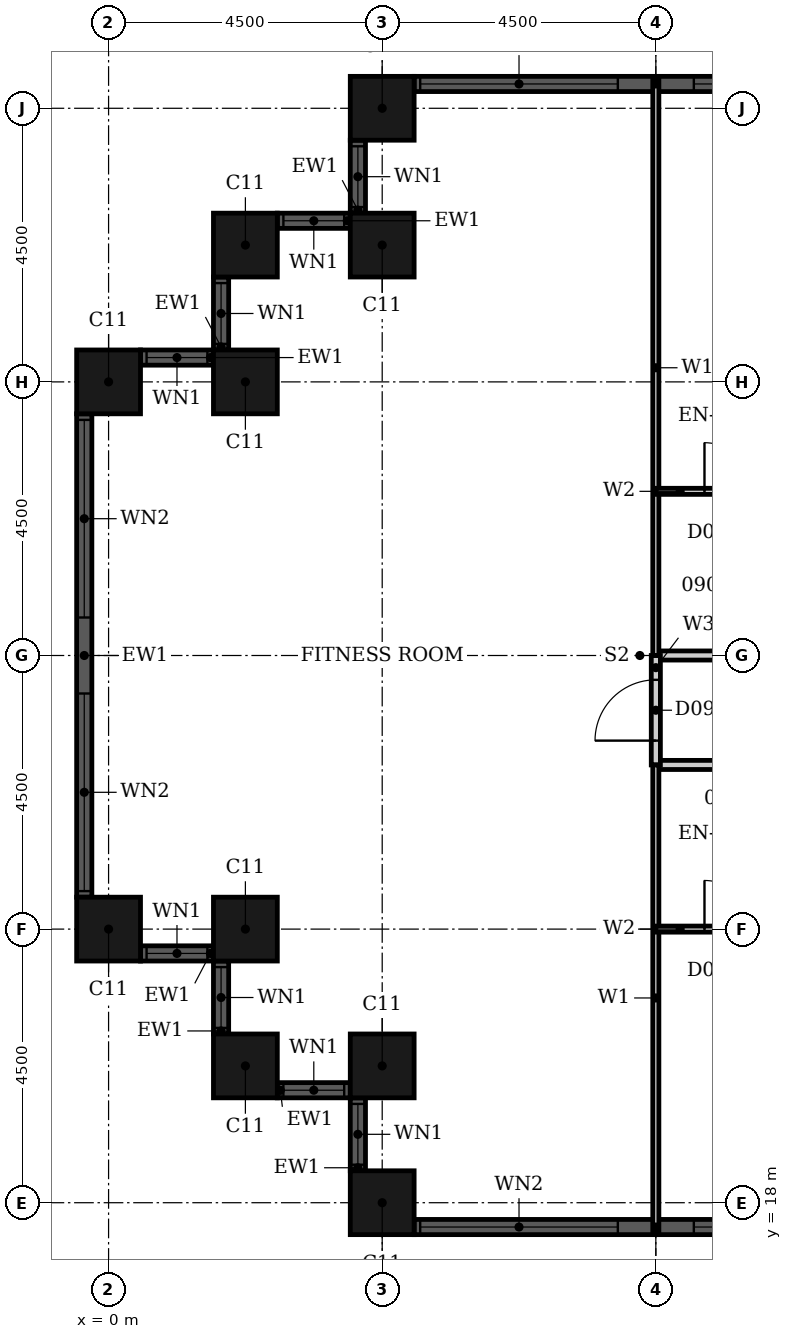
"""IFC4 building model, lengths in metres.
Left out: names, types, materials, properties, quantities, classifications, styles, units other than length and angle.
Written with IfcOpenShell. Run it as: python <this file> out.ifc"""

import sys

from ifc_helpers import new_model, si_unit, direction, frame, frame_2d, origin, origin_2d, place, context, subcontext, project, spatial, rectangle, hollow_rectangle, extrude, element, fill, save


model = new_model("IFC4")
c1 = context("Model", 3, precision=1e-05, world=origin(), true_north=direction((0.0, 1.0)))
c2 = subcontext(c1, "Body", "Model", "MODEL_VIEW")
j1 = project(units=[si_unit("LENGTHUNIT", "METRE"), si_unit("PLANEANGLEUNIT", "RADIAN")], contexts=[c1])
p1 = place(None, origin())
s1 = spatial("IfcSite", under=j1, at=p1, CompositionType="ELEMENT")
p2 = place(p1, origin())
s2 = spatial("IfcBuilding", under=s1, at=p2, CompositionType="ELEMENT")
p3 = place(p2, frame((0.0, 0.0, 44.4)))
s3 = spatial("IfcBuildingStorey", under=s2, at=p3, CompositionType="ELEMENT", Elevation=44.4)
for number, where, z_axis, x_axis in (
    (1, (4.5, 36.0, 0.0), (0.0, 0.0, 1.0), (1.0, 0.0, 0.0)),
    (2, (4.5, 33.75, 0.0), (0.0, 0.0, 1.0), (1.0, 0.0, 0.0)),
    (3, (2.25, 33.75, 0.0), (0.0, 0.0, 1.0), (1.0, 0.0, 0.0)),
    (4, (2.25, 31.5, 0.0), (0.0, 0.0, 1.0), (1.0, 0.0, 0.0)),
    (5, (0.0, 31.5, 0.0), (0.0, 0.0, 1.0), (1.0, 0.0, 0.0)),
    (6, (0.0, 22.5, 0.0), (0.0, 0.0, 1.0), (1.0, 0.0, 0.0)),
    (7, (2.25, 22.5, 0.0), (0.0, 0.0, 1.0), (1.0, 0.0, 0.0)),
    (8, (2.25, 20.25, 0.0), (0.0, 0.0, 1.0), (1.0, 0.0, 0.0)),
    (9, (4.5, 20.25, 0.0), (0.0, 0.0, 1.0), (1.0, 0.0, 0.0)),
    (10, (4.5, 18.0, 0.0), (0.0, 0.0, 1.0), (1.0, 0.0, 0.0)),
):
    element("IfcColumn", number, at=place(p3, frame(where, z_axis=z_axis, x_axis=x_axis)), inside=s3, PredefinedType="COLUMN", context=c2, shape_type="SweptSolid", body=[
        extrude(hollow_rectangle(XDim=1.05, YDim=1.05, WallThickness=0.034, at=origin_2d()), origin(), (0.0, 0.0, 1.0), 3.6),
    ])
p4 = place(p3, frame((12.975, 36.4, 0.0), z_axis=(0.0, 0.0, 1.0), x_axis=(-1.0, 0.0, 0.0)))
e11 = element("IfcWall", 11, at=p4, inside=s3, PredefinedType="SOLIDWALL", context=c2, shape_type="SweptSolid", body=[
    extrude(rectangle(XDim=7.95, YDim=0.25, at=frame_2d((3.975, 0.0))), origin(), (0.0, 0.0, 1.0), 3.6),
])
p5 = place(p4, frame((0.1, 0.0, 0.9)))
e12 = element("IfcOpeningElement", 12, at=p5, cuts=e11, PredefinedType="OPENING", context=c2, shape_type="SweptSolid", body=[
    extrude(rectangle(XDim=3.25, YDim=2.08, at=frame_2d((1.625, 1.04))), frame((0.0, 0.135, 0.0), z_axis=(0.0, -1.0, 0.0), x_axis=(1.0, 0.0, 0.0)), (0.0, 0.0, 1.0), 0.27),
])
p6 = place(p4, frame((4.6, 0.0, 0.9)))
e13 = element("IfcOpeningElement", 13, at=p6, cuts=e11, PredefinedType="OPENING", context=c2, shape_type="SweptSolid", body=[
    extrude(rectangle(XDim=3.25, YDim=2.08, at=frame_2d((1.625, 1.04))), frame((0.0, 0.135, 0.0), z_axis=(0.0, -1.0, 0.0), x_axis=(1.0, 0.0, 0.0)), (0.0, 0.0, 1.0), 0.27),
])
p7 = place(p3, frame((4.1, 35.475, 0.0), z_axis=(0.0, 0.0, 1.0), x_axis=(0.0, -1.0, 0.0)))
e14 = element("IfcWall", 14, at=p7, inside=s3, PredefinedType="SOLIDWALL", context=c2, shape_type="SweptSolid", body=[
    extrude(rectangle(XDim=1.2, YDim=0.25, at=frame_2d((0.6, 0.0))), origin(), (0.0, 0.0, 1.0), 3.6),
])
p8 = place(p7, frame((0.1, 0.0, 0.9)))
e15 = element("IfcOpeningElement", 15, at=p8, cuts=e14, PredefinedType="OPENING", context=c2, shape_type="SweptSolid", body=[
    extrude(rectangle(XDim=1.0, YDim=2.08, at=frame_2d((0.5, 1.04))), frame((0.0, 0.135, 0.0), z_axis=(0.0, -1.0, 0.0), x_axis=(1.0, 0.0, 0.0)), (0.0, 0.0, 1.0), 0.27),
])
p9 = place(p3, frame((3.975, 34.15, 0.0), z_axis=(0.0, 0.0, 1.0), x_axis=(-1.0, 0.0, 0.0)))
e16 = element("IfcWall", 16, at=p9, inside=s3, PredefinedType="SOLIDWALL", context=c2, shape_type="SweptSolid", body=[
    extrude(rectangle(XDim=1.2, YDim=0.25, at=frame_2d((0.6, 0.0))), origin(), (0.0, 0.0, 1.0), 3.6),
])
p10 = place(p9, frame((0.1, 0.0, 0.9)))
e17 = element("IfcOpeningElement", 17, at=p10, cuts=e16, PredefinedType="OPENING", context=c2, shape_type="SweptSolid", body=[
    extrude(rectangle(XDim=1.0, YDim=2.08, at=frame_2d((0.5, 1.04))), frame((0.0, 0.135, 0.0), z_axis=(0.0, -1.0, 0.0), x_axis=(1.0, 0.0, 0.0)), (0.0, 0.0, 1.0), 0.27),
])
p11 = place(p3, frame((1.85, 33.225, 0.0), z_axis=(0.0, 0.0, 1.0), x_axis=(0.0, -1.0, 0.0)))
e18 = element("IfcWall", 18, at=p11, inside=s3, PredefinedType="SOLIDWALL", context=c2, shape_type="SweptSolid", body=[
    extrude(rectangle(XDim=1.2, YDim=0.25, at=frame_2d((0.6, 0.0))), origin(), (0.0, 0.0, 1.0), 3.6),
])
p12 = place(p11, frame((0.1, 0.0, 0.9)))
e19 = element("IfcOpeningElement", 19, at=p12, cuts=e18, PredefinedType="OPENING", context=c2, shape_type="SweptSolid", body=[
    extrude(rectangle(XDim=1.0, YDim=2.08, at=frame_2d((0.5, 1.04))), frame((0.0, 0.135, 0.0), z_axis=(0.0, -1.0, 0.0), x_axis=(1.0, 0.0, 0.0)), (0.0, 0.0, 1.0), 0.27),
])
p13 = place(p3, frame((1.725, 31.9, 0.0), z_axis=(0.0, 0.0, 1.0), x_axis=(-1.0, 0.0, 0.0)))
e20 = element("IfcWall", 20, at=p13, inside=s3, PredefinedType="SOLIDWALL", context=c2, shape_type="SweptSolid", body=[
    extrude(rectangle(XDim=1.2, YDim=0.25, at=frame_2d((0.6, 0.0))), origin(), (0.0, 0.0, 1.0), 3.6),
])
p14 = place(p13, frame((0.1, 0.0, 0.9)))
e21 = element("IfcOpeningElement", 21, at=p14, cuts=e20, PredefinedType="OPENING", context=c2, shape_type="SweptSolid", body=[
    extrude(rectangle(XDim=1.0, YDim=2.08, at=frame_2d((0.5, 1.04))), frame((0.0, 0.135, 0.0), z_axis=(0.0, -1.0, 0.0), x_axis=(1.0, 0.0, 0.0)), (0.0, 0.0, 1.0), 0.27),
])
p15 = place(p3, frame((-0.4, 30.975, 0.0), z_axis=(0.0, 0.0, 1.0), x_axis=(0.0, -1.0, 0.0)))
e22 = element("IfcWall", 22, at=p15, inside=s3, PredefinedType="SOLIDWALL", context=c2, shape_type="SweptSolid", body=[
    extrude(rectangle(XDim=7.95, YDim=0.25, at=frame_2d((3.975, 0.0))), origin(), (0.0, 0.0, 1.0), 3.6),
])
p16 = place(p15, frame((0.1, 0.0, 0.9)))
e23 = element("IfcOpeningElement", 23, at=p16, cuts=e22, PredefinedType="OPENING", context=c2, shape_type="SweptSolid", body=[
    extrude(rectangle(XDim=3.25, YDim=2.08, at=frame_2d((1.625, 1.04))), frame((0.0, 0.135, 0.0), z_axis=(0.0, -1.0, 0.0), x_axis=(1.0, 0.0, 0.0)), (0.0, 0.0, 1.0), 0.27),
])
p17 = place(p15, frame((4.6, 0.0, 0.9)))
e24 = element("IfcOpeningElement", 24, at=p17, cuts=e22, PredefinedType="OPENING", context=c2, shape_type="SweptSolid", body=[
    extrude(rectangle(XDim=3.25, YDim=2.08, at=frame_2d((1.625, 1.04))), frame((0.0, 0.135, 0.0), z_axis=(0.0, -1.0, 0.0), x_axis=(1.0, 0.0, 0.0)), (0.0, 0.0, 1.0), 0.27),
])
p18 = place(p3, frame((0.525, 22.1, 0.0), z_axis=(0.0, 0.0, 1.0), x_axis=(1.0, 0.0, 0.0)))
e25 = element("IfcWall", 25, at=p18, inside=s3, PredefinedType="SOLIDWALL", context=c2, shape_type="SweptSolid", body=[
    extrude(rectangle(XDim=1.2, YDim=0.25, at=frame_2d((0.6, 0.0))), origin(), (0.0, 0.0, 1.0), 3.6),
])
p19 = place(p18, frame((0.1, 0.0, 0.9)))
e26 = element("IfcOpeningElement", 26, at=p19, cuts=e25, PredefinedType="OPENING", context=c2, shape_type="SweptSolid", body=[
    extrude(rectangle(XDim=1.0, YDim=2.08, at=frame_2d((0.5, 1.04))), frame((0.0, 0.135, 0.0), z_axis=(0.0, -1.0, 0.0), x_axis=(1.0, 0.0, 0.0)), (0.0, 0.0, 1.0), 0.27),
])
p20 = place(p3, frame((1.85, 21.975, 0.0), z_axis=(0.0, 0.0, 1.0), x_axis=(0.0, -1.0, 0.0)))
e27 = element("IfcWall", 27, at=p20, inside=s3, PredefinedType="SOLIDWALL", context=c2, shape_type="SweptSolid", body=[
    extrude(rectangle(XDim=1.2, YDim=0.25, at=frame_2d((0.6, 0.0))), origin(), (0.0, 0.0, 1.0), 3.6),
])
p21 = place(p20, frame((0.1, 0.0, 0.9)))
e28 = element("IfcOpeningElement", 28, at=p21, cuts=e27, PredefinedType="OPENING", context=c2, shape_type="SweptSolid", body=[
    extrude(rectangle(XDim=1.0, YDim=2.08, at=frame_2d((0.5, 1.04))), frame((0.0, 0.135, 0.0), z_axis=(0.0, -1.0, 0.0), x_axis=(1.0, 0.0, 0.0)), (0.0, 0.0, 1.0), 0.27),
])
p22 = place(p3, frame((2.775, 19.85, 0.0), z_axis=(0.0, 0.0, 1.0), x_axis=(1.0, 0.0, 0.0)))
e29 = element("IfcWall", 29, at=p22, inside=s3, PredefinedType="SOLIDWALL", context=c2, shape_type="SweptSolid", body=[
    extrude(rectangle(XDim=1.2, YDim=0.25, at=frame_2d((0.6, 0.0))), origin(), (0.0, 0.0, 1.0), 3.6),
])
p23 = place(p22, frame((0.1, 0.0, 0.9)))
e30 = element("IfcOpeningElement", 30, at=p23, cuts=e29, PredefinedType="OPENING", context=c2, shape_type="SweptSolid", body=[
    extrude(rectangle(XDim=1.0, YDim=2.08, at=frame_2d((0.5, 1.04))), frame((0.0, 0.135, 0.0), z_axis=(0.0, -1.0, 0.0), x_axis=(1.0, 0.0, 0.0)), (0.0, 0.0, 1.0), 0.27),
])
p24 = place(p3, frame((4.1, 19.725, 0.0), z_axis=(0.0, 0.0, 1.0), x_axis=(0.0, -1.0, 0.0)))
e31 = element("IfcWall", 31, at=p24, inside=s3, PredefinedType="SOLIDWALL", context=c2, shape_type="SweptSolid", body=[
    extrude(rectangle(XDim=1.2, YDim=0.25, at=frame_2d((0.6, 0.0))), origin(), (0.0, 0.0, 1.0), 3.6),
])
p25 = place(p24, frame((0.1, 0.0, 0.9)))
e32 = element("IfcOpeningElement", 32, at=p25, cuts=e31, PredefinedType="OPENING", context=c2, shape_type="SweptSolid", body=[
    extrude(rectangle(XDim=1.0, YDim=2.08, at=frame_2d((0.5, 1.04))), frame((0.0, 0.135, 0.0), z_axis=(0.0, -1.0, 0.0), x_axis=(1.0, 0.0, 0.0)), (0.0, 0.0, 1.0), 0.27),
])
p26 = place(p3, frame((5.025, 17.6, 0.0), z_axis=(0.0, 0.0, 1.0), x_axis=(1.0, 0.0, 0.0)))
e33 = element("IfcWall", 33, at=p26, inside=s3, PredefinedType="SOLIDWALL", context=c2, shape_type="SweptSolid", body=[
    extrude(rectangle(XDim=7.95, YDim=0.25, at=frame_2d((3.975, 0.0))), origin(), (0.0, 0.0, 1.0), 3.6),
])
p27 = place(p26, frame((0.1, 0.0, 0.9)))
e34 = element("IfcOpeningElement", 34, at=p27, cuts=e33, PredefinedType="OPENING", context=c2, shape_type="SweptSolid", body=[
    extrude(rectangle(XDim=3.25, YDim=2.08, at=frame_2d((1.625, 1.04))), frame((0.0, 0.135, 0.0), z_axis=(0.0, -1.0, 0.0), x_axis=(1.0, 0.0, 0.0)), (0.0, 0.0, 1.0), 0.27),
])
p28 = place(p26, frame((4.6, 0.0, 0.9)))
e35 = element("IfcOpeningElement", 35, at=p28, cuts=e33, PredefinedType="OPENING", context=c2, shape_type="SweptSolid", body=[
    extrude(rectangle(XDim=3.25, YDim=2.08, at=frame_2d((1.625, 1.04))), frame((0.0, 0.135, 0.0), z_axis=(0.0, -1.0, 0.0), x_axis=(1.0, 0.0, 0.0)), (0.0, 0.0, 1.0), 0.27),
])
p29 = place(p3, frame((9.0, 25.2, 0.0), z_axis=(0.0, 0.0, 1.0), x_axis=(1.0, 0.0, 0.0)))
e36 = element("IfcWall", 36, at=p29, inside=s3, PredefinedType="PARTITIONING", context=c2, shape_type="SweptSolid", body=[
    extrude(rectangle(XDim=7.2, YDim=0.15, at=frame_2d((3.6, 0.0))), origin(), (0.0, 0.0, 1.0), 3.2),
])
p30 = place(p29, frame((2.95, 0.0, 0.0)))
e37 = element("IfcOpeningElement", 37, at=p30, cuts=e36, PredefinedType="OPENING", context=c2, shape_type="SweptSolid", body=[
    extrude(rectangle(XDim=1.0, YDim=2.1, at=frame_2d((0.5, 1.05))), frame((0.0, 0.085, 0.0), z_axis=(0.0, -1.0, 0.0), x_axis=(1.0, 0.0, 0.0)), (0.0, 0.0, 1.0), 0.17),
])
p31 = place(p3, frame((9.0, 27.0, 0.0), z_axis=(0.0, 0.0, 1.0), x_axis=(1.0, 0.0, 0.0)))
e38 = element("IfcWall", 38, at=p31, inside=s3, PredefinedType="PARTITIONING", context=c2, shape_type="SweptSolid", body=[
    extrude(rectangle(XDim=7.2, YDim=0.15, at=frame_2d((3.6, 0.0))), origin(), (0.0, 0.0, 1.0), 2.48),
])
p32 = place(p31, frame((2.95, 0.0, 0.0)))
e39 = element("IfcOpeningElement", 39, at=p32, cuts=e38, PredefinedType="OPENING", context=c2, shape_type="SweptSolid", body=[
    extrude(rectangle(XDim=1.0, YDim=2.1, at=frame_2d((0.5, 1.05))), frame((0.0, 0.085, 0.0), z_axis=(0.0, -1.0, 0.0), x_axis=(1.0, 0.0, 0.0)), (0.0, 0.0, 1.0), 0.17),
])
p33 = place(p3, frame((9.0, 25.2, 0.0), z_axis=(0.0, 0.0, 1.0), x_axis=(0.0, 1.0, 0.0)))
e40 = element("IfcWall", 40, at=p33, inside=s3, PredefinedType="PARTITIONING", context=c2, shape_type="SweptSolid", body=[
    extrude(rectangle(XDim=1.8, YDim=0.15, at=frame_2d((0.9, 0.0))), origin(), (0.0, 0.0, 1.0), 3.2),
])
p34 = place(p33, frame((0.4, 0.0, 0.0)))
e41 = element("IfcOpeningElement", 41, at=p34, cuts=e40, PredefinedType="OPENING", context=c2, shape_type="SweptSolid", body=[
    extrude(rectangle(XDim=1.0, YDim=2.1, at=frame_2d((0.5, 1.05))), frame((0.0, 0.085, 0.0), z_axis=(0.0, -1.0, 0.0), x_axis=(1.0, 0.0, 0.0)), (0.0, 0.0, 1.0), 0.17),
])
p35 = place(p3, frame((9.0, 27.0, 0.0), z_axis=(0.0, 0.0, 1.0), x_axis=(0.0, 1.0, 0.0)))
e42 = element("IfcWall", 42, at=p35, inside=s3, PredefinedType="PARTITIONING", context=c2, shape_type="SweptSolid", body=[
    extrude(rectangle(XDim=9.465, YDim=0.1, at=frame_2d((4.732, 0.0))), origin(), (0.0, 0.0, 1.0), 3.2),
])
p36 = place(p3, frame((9.0, 17.535, 0.0), z_axis=(0.0, 0.0, 1.0), x_axis=(0.0, 1.0, 0.0)))
e43 = element("IfcWall", 43, at=p36, inside=s3, PredefinedType="PARTITIONING", context=c2, shape_type="SweptSolid", body=[
    extrude(rectangle(XDim=7.665, YDim=0.1, at=frame_2d((3.833, 0.0))), origin(), (0.0, 0.0, 1.0), 3.2),
])
p37 = place(p3, frame((9.0, 22.5, 0.0), z_axis=(0.0, 0.0, 1.0), x_axis=(1.0, 0.0, 0.0)))
e44 = element("IfcWall", 44, at=p37, inside=s3, PredefinedType="PARTITIONING", context=c2, shape_type="SweptSolid", body=[
    extrude(rectangle(XDim=2.4, YDim=0.1, at=frame_2d((1.2, 0.0))), origin(), (0.0, 0.0, 1.0), 2.48),
])
p38 = place(p37, frame((0.8, 0.0, 0.0)))
e45 = element("IfcOpeningElement", 45, at=p38, cuts=e44, PredefinedType="OPENING", context=c2, shape_type="SweptSolid", body=[
    extrude(rectangle(XDim=0.8, YDim=2.1, at=frame_2d((0.4, 1.05))), frame((0.0, 0.06, 0.0), z_axis=(0.0, -1.0, 0.0), x_axis=(1.0, 0.0, 0.0)), (0.0, 0.0, 1.0), 0.12),
])
p39 = place(p3, frame((9.0, 29.7, 0.0), z_axis=(0.0, 0.0, 1.0), x_axis=(1.0, 0.0, 0.0)))
e46 = element("IfcWall", 46, at=p39, inside=s3, PredefinedType="PARTITIONING", context=c2, shape_type="SweptSolid", body=[
    extrude(rectangle(XDim=2.4, YDim=0.1, at=frame_2d((1.2, 0.0))), origin(), (0.0, 0.0, 1.0), 3.2),
])
p40 = place(p39, frame((0.8, 0.0, 0.0)))
e47 = element("IfcOpeningElement", 47, at=p40, cuts=e46, PredefinedType="OPENING", context=c2, shape_type="SweptSolid", body=[
    extrude(rectangle(XDim=0.8, YDim=2.1, at=frame_2d((0.4, 1.05))), frame((0.0, 0.06, 0.0), z_axis=(0.0, -1.0, 0.0), x_axis=(1.0, 0.0, 0.0)), (0.0, 0.0, 1.0), 0.12),
])
p41 = place(p5, origin())
e48 = element("IfcWindow", 48, at=p41, inside=s3, PartitioningType="SINGLE_PANEL", PredefinedType="WINDOW", context=c2, shape_type="SweptSolid", body=[
    extrude(rectangle(XDim=3.25, YDim=2.08, at=frame_2d((1.625, 1.04))), frame((0.0, 0.03, 0.0), z_axis=(0.0, -1.0, 0.0), x_axis=(1.0, 0.0, 0.0)), (0.0, 0.0, 1.0), 0.06),
])
fill(e12, e48)
p42 = place(p6, origin())
e49 = element("IfcWindow", 49, at=p42, inside=s3, PartitioningType="SINGLE_PANEL", PredefinedType="WINDOW", context=c2, shape_type="SweptSolid", body=[
    extrude(rectangle(XDim=3.25, YDim=2.08, at=frame_2d((1.625, 1.04))), frame((0.0, 0.03, 0.0), z_axis=(0.0, -1.0, 0.0), x_axis=(1.0, 0.0, 0.0)), (0.0, 0.0, 1.0), 0.06),
])
fill(e13, e49)
p43 = place(p8, origin())
e50 = element("IfcWindow", 50, at=p43, inside=s3, PartitioningType="SINGLE_PANEL", PredefinedType="WINDOW", context=c2, shape_type="SweptSolid", body=[
    extrude(rectangle(XDim=1.0, YDim=2.08, at=frame_2d((0.5, 1.04))), frame((0.0, 0.03, 0.0), z_axis=(0.0, -1.0, 0.0), x_axis=(1.0, 0.0, 0.0)), (0.0, 0.0, 1.0), 0.06),
])
fill(e15, e50)
p44 = place(p10, origin())
e51 = element("IfcWindow", 51, at=p44, inside=s3, PartitioningType="SINGLE_PANEL", PredefinedType="WINDOW", context=c2, shape_type="SweptSolid", body=[
    extrude(rectangle(XDim=1.0, YDim=2.08, at=frame_2d((0.5, 1.04))), frame((0.0, 0.03, 0.0), z_axis=(0.0, -1.0, 0.0), x_axis=(1.0, 0.0, 0.0)), (0.0, 0.0, 1.0), 0.06),
])
fill(e17, e51)
p45 = place(p12, origin())
e52 = element("IfcWindow", 52, at=p45, inside=s3, PartitioningType="SINGLE_PANEL", PredefinedType="WINDOW", context=c2, shape_type="SweptSolid", body=[
    extrude(rectangle(XDim=1.0, YDim=2.08, at=frame_2d((0.5, 1.04))), frame((0.0, 0.03, 0.0), z_axis=(0.0, -1.0, 0.0), x_axis=(1.0, 0.0, 0.0)), (0.0, 0.0, 1.0), 0.06),
])
fill(e19, e52)
p46 = place(p14, origin())
e53 = element("IfcWindow", 53, at=p46, inside=s3, PartitioningType="SINGLE_PANEL", PredefinedType="WINDOW", context=c2, shape_type="SweptSolid", body=[
    extrude(rectangle(XDim=1.0, YDim=2.08, at=frame_2d((0.5, 1.04))), frame((0.0, 0.03, 0.0), z_axis=(0.0, -1.0, 0.0), x_axis=(1.0, 0.0, 0.0)), (0.0, 0.0, 1.0), 0.06),
])
fill(e21, e53)
p47 = place(p16, origin())
e54 = element("IfcWindow", 54, at=p47, inside=s3, PartitioningType="SINGLE_PANEL", PredefinedType="WINDOW", context=c2, shape_type="SweptSolid", body=[
    extrude(rectangle(XDim=3.25, YDim=2.08, at=frame_2d((1.625, 1.04))), frame((0.0, 0.03, 0.0), z_axis=(0.0, -1.0, 0.0), x_axis=(1.0, 0.0, 0.0)), (0.0, 0.0, 1.0), 0.06),
])
fill(e23, e54)
p48 = place(p17, origin())
e55 = element("IfcWindow", 55, at=p48, inside=s3, PartitioningType="SINGLE_PANEL", PredefinedType="WINDOW", context=c2, shape_type="SweptSolid", body=[
    extrude(rectangle(XDim=3.25, YDim=2.08, at=frame_2d((1.625, 1.04))), frame((0.0, 0.03, 0.0), z_axis=(0.0, -1.0, 0.0), x_axis=(1.0, 0.0, 0.0)), (0.0, 0.0, 1.0), 0.06),
])
fill(e24, e55)
p49 = place(p19, origin())
e56 = element("IfcWindow", 56, at=p49, inside=s3, PartitioningType="SINGLE_PANEL", PredefinedType="WINDOW", context=c2, shape_type="SweptSolid", body=[
    extrude(rectangle(XDim=1.0, YDim=2.08, at=frame_2d((0.5, 1.04))), frame((0.0, 0.03, 0.0), z_axis=(0.0, -1.0, 0.0), x_axis=(1.0, 0.0, 0.0)), (0.0, 0.0, 1.0), 0.06),
])
fill(e26, e56)
p50 = place(p21, origin())
e57 = element("IfcWindow", 57, at=p50, inside=s3, PartitioningType="SINGLE_PANEL", PredefinedType="WINDOW", context=c2, shape_type="SweptSolid", body=[
    extrude(rectangle(XDim=1.0, YDim=2.08, at=frame_2d((0.5, 1.04))), frame((0.0, 0.03, 0.0), z_axis=(0.0, -1.0, 0.0), x_axis=(1.0, 0.0, 0.0)), (0.0, 0.0, 1.0), 0.06),
])
fill(e28, e57)
p51 = place(p23, origin())
e58 = element("IfcWindow", 58, at=p51, inside=s3, PartitioningType="SINGLE_PANEL", PredefinedType="WINDOW", context=c2, shape_type="SweptSolid", body=[
    extrude(rectangle(XDim=1.0, YDim=2.08, at=frame_2d((0.5, 1.04))), frame((0.0, 0.03, 0.0), z_axis=(0.0, -1.0, 0.0), x_axis=(1.0, 0.0, 0.0)), (0.0, 0.0, 1.0), 0.06),
])
fill(e30, e58)
p52 = place(p25, origin())
e59 = element("IfcWindow", 59, at=p52, inside=s3, PartitioningType="SINGLE_PANEL", PredefinedType="WINDOW", context=c2, shape_type="SweptSolid", body=[
    extrude(rectangle(XDim=1.0, YDim=2.08, at=frame_2d((0.5, 1.04))), frame((0.0, 0.03, 0.0), z_axis=(0.0, -1.0, 0.0), x_axis=(1.0, 0.0, 0.0)), (0.0, 0.0, 1.0), 0.06),
])
fill(e32, e59)
p53 = place(p27, origin())
e60 = element("IfcWindow", 60, at=p53, inside=s3, PartitioningType="SINGLE_PANEL", PredefinedType="WINDOW", context=c2, shape_type="SweptSolid", body=[
    extrude(rectangle(XDim=3.25, YDim=2.08, at=frame_2d((1.625, 1.04))), frame((0.0, 0.03, 0.0), z_axis=(0.0, -1.0, 0.0), x_axis=(1.0, 0.0, 0.0)), (0.0, 0.0, 1.0), 0.06),
])
fill(e34, e60)
p54 = place(p28, origin())
e61 = element("IfcWindow", 61, at=p54, inside=s3, PartitioningType="SINGLE_PANEL", PredefinedType="WINDOW", context=c2, shape_type="SweptSolid", body=[
    extrude(rectangle(XDim=3.25, YDim=2.08, at=frame_2d((1.625, 1.04))), frame((0.0, 0.03, 0.0), z_axis=(0.0, -1.0, 0.0), x_axis=(1.0, 0.0, 0.0)), (0.0, 0.0, 1.0), 0.06),
])
fill(e35, e61)
p55 = place(p38, origin())
e62 = element("IfcDoor", 62, at=p55, inside=s3, OperationType="SINGLE_SWING_RIGHT", PredefinedType="DOOR", context=c2, shape_type="SweptSolid", body=[
    extrude(rectangle(XDim=0.8, YDim=2.1, at=frame_2d((0.4, 1.05))), frame((0.0, 0.025, 0.0), z_axis=(0.0, -1.0, 0.0), x_axis=(1.0, 0.0, 0.0)), (0.0, 0.0, 1.0), 0.05),
])
fill(e45, e62)
p56 = place(p40, origin())
e63 = element("IfcDoor", 63, at=p56, inside=s3, OperationType="SINGLE_SWING_RIGHT", PredefinedType="DOOR", context=c2, shape_type="SweptSolid", body=[
    extrude(rectangle(XDim=0.8, YDim=2.1, at=frame_2d((0.4, 1.05))), frame((0.0, 0.025, 0.0), z_axis=(0.0, -1.0, 0.0), x_axis=(1.0, 0.0, 0.0)), (0.0, 0.0, 1.0), 0.05),
])
fill(e47, e63)
p57 = place(p34, origin())
e64 = element("IfcDoor", 64, at=p57, inside=s3, OperationType="SINGLE_SWING_LEFT", PredefinedType="DOOR", context=c2, shape_type="SweptSolid", body=[
    extrude(rectangle(XDim=1.0, YDim=2.1, at=frame_2d((0.5, 1.05))), frame((0.0, 0.025, 0.0), z_axis=(0.0, -1.0, 0.0), x_axis=(1.0, 0.0, 0.0)), (0.0, 0.0, 1.0), 0.05),
])
fill(e41, e64)
save(model, sys.argv[1])
